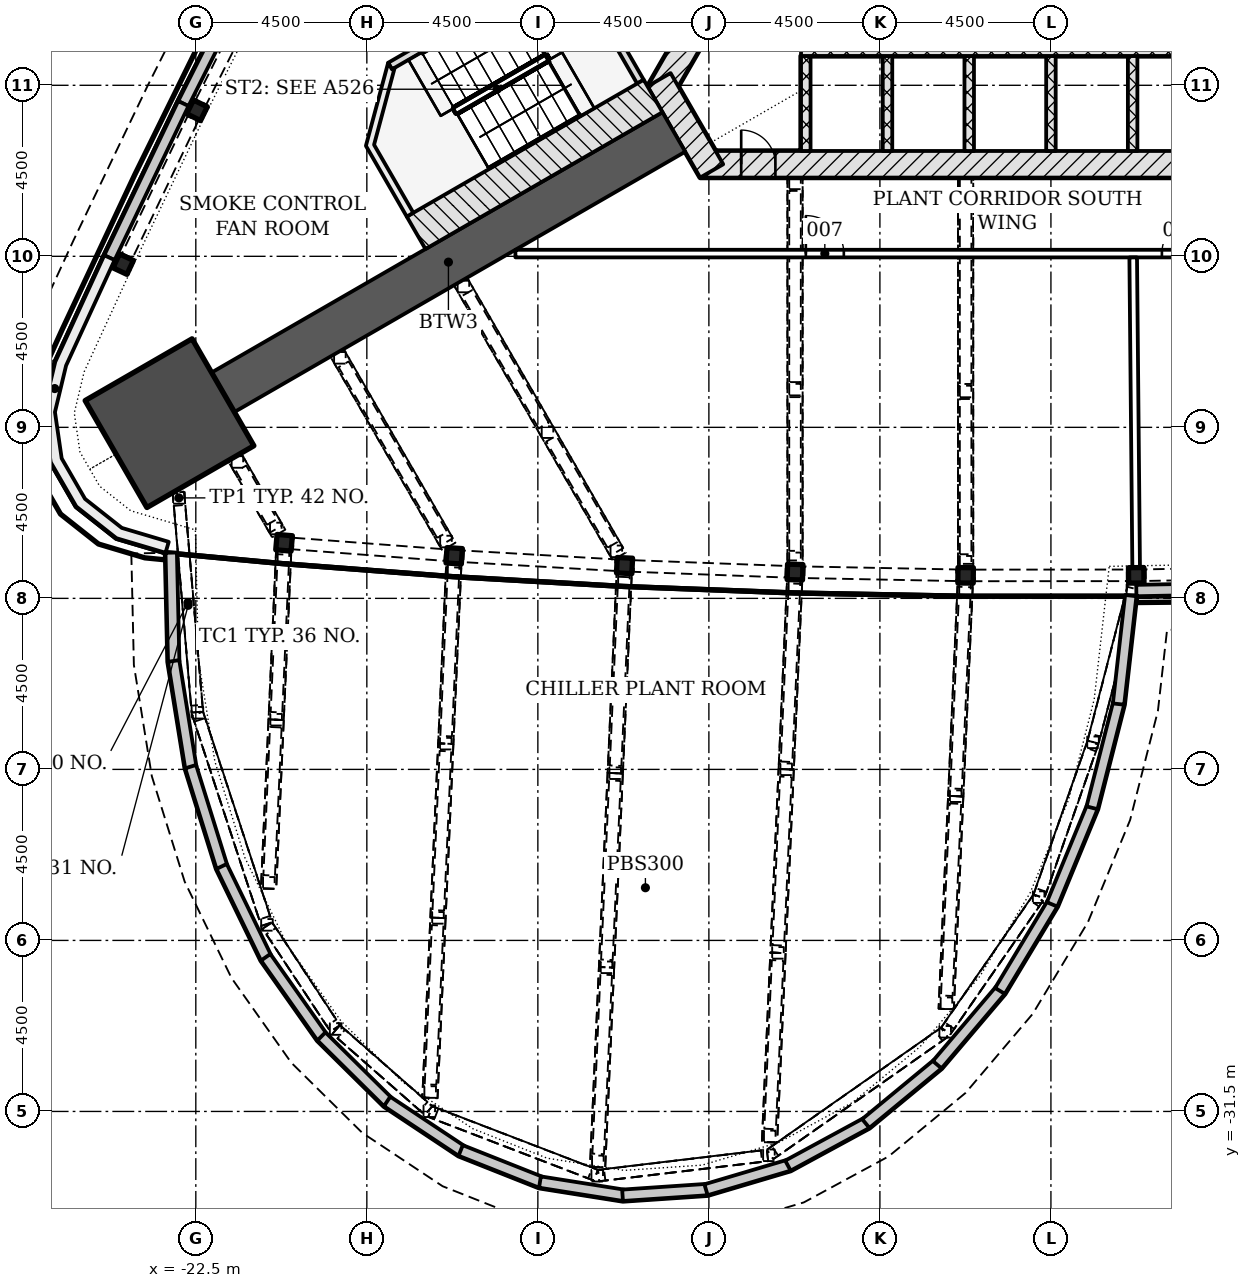
"""IFC4 building model, lengths in metres.
Left out: names, types, materials, properties, quantities, classifications, styles, units other than length and angle.
Written with IfcOpenShell. Run it as: python <this file> out.ifc"""

import sys

from ifc_helpers import new_model, si_unit, direction, frame, frame_2d, origin, origin_2d, place, context, subcontext, project, spatial, polyline, rectangle, i_section, outline, extrude, element, fill, save


model = new_model("IFC4")
c1 = context("Model", 3, precision=1e-05, world=origin(), true_north=direction((0.0, 1.0)))
c2 = subcontext(c1, "Body", "Model", "MODEL_VIEW")
j1 = project(units=[si_unit("LENGTHUNIT", "METRE"), si_unit("PLANEANGLEUNIT", "RADIAN")], contexts=[c1])
p1 = place(None, origin())
s1 = spatial("IfcSite", under=j1, at=p1, CompositionType="ELEMENT")
p2 = place(p1, origin())
s2 = spatial("IfcBuilding", under=s1, at=p2, CompositionType="ELEMENT")
p3 = place(p2, frame((0.0, 0.0, 52.8)))
s3 = spatial("IfcBuildingStorey", under=s2, at=p3, CompositionType="ELEMENT", Elevation=52.8)
p4 = place(p3, frame((-9.229, -6.578, -0.3), z_axis=(0.0, 0.0, 1.0), x_axis=(1.0, 0.0, 0.0)))
e1 = element("IfcWall", 1, at=p4, inside=s3, PredefinedType="SHEAR", context=c2, shape_type="SweptSolid", body=[
    extrude(rectangle(XDim=18.458, YDim=0.7, at=frame_2d((9.229, 0.0))), origin(), (0.0, 0.0, 1.0), 5.5),
])
p5 = place(p4, frame((1.079, 0.0, 0.3)))
e2 = element("IfcOpeningElement", 2, at=p5, cuts=e1, PredefinedType="OPENING", context=c2, shape_type="SweptSolid", body=[
    extrude(rectangle(XDim=0.9, YDim=2.1, at=frame_2d((0.45, 1.05))), frame((0.0, 0.36, 0.0), z_axis=(0.0, -1.0, 0.0), x_axis=(1.0, 0.0, 0.0)), (0.0, 0.0, 1.0), 0.72),
])
p6 = place(p3, frame((10.311, -4.703, -0.3), z_axis=(0.0, 0.0, 1.0), x_axis=(-0.500001446645, 0.866024568562, 0.0)))
e3 = element("IfcWall", 3, at=p6, inside=s3, PredefinedType="SHEAR", context=c2, shape_type="SweptSolid", body=[
    extrude(rectangle(XDim=18.458, YDim=0.7, at=frame_2d((9.229, 0.0))), origin(), (0.0, 0.0, 1.0), 5.5),
])
p7 = place(p6, frame((8.7, 0.0, 0.3)))
e4 = element("IfcOpeningElement", 4, at=p7, cuts=e3, PredefinedType="OPENING", context=c2, shape_type="SweptSolid", body=[
    extrude(rectangle(XDim=1.0, YDim=2.1, at=frame_2d((0.5, 1.05))), frame((0.0, 0.36, 0.0), z_axis=(0.0, -1.0, 0.0), x_axis=(1.0, 0.0, 0.0)), (0.0, 0.0, 1.0), 0.72),
])
p8 = place(p6, frame((4.002, 0.0, 0.3)))
e5 = element("IfcOpeningElement", 5, at=p8, cuts=e3, PredefinedType="OPENING", context=c2, shape_type="SweptSolid", body=[
    extrude(rectangle(XDim=0.9, YDim=2.1, at=frame_2d((0.45, 1.05))), frame((0.0, 0.36, 0.0), z_axis=(0.0, -1.0, 0.0), x_axis=(1.0, 0.0, 0.0)), (0.0, 0.0, 1.0), 0.72),
])
p9 = place(p6, frame((14.093, 0.0, 0.3)))
e6 = element("IfcOpeningElement", 6, at=p9, cuts=e3, PredefinedType="OPENING", context=c2, shape_type="SweptSolid", body=[
    extrude(rectangle(XDim=0.9, YDim=2.1, at=frame_2d((0.45, 1.05))), frame((0.0, 0.36, 0.0), z_axis=(0.0, -1.0, 0.0), x_axis=(1.0, 0.0, 0.0)), (0.0, 0.0, 1.0), 0.72),
])
p10 = place(p3, frame((-1.083, 11.281, -0.3), z_axis=(0.0, 0.0, 1.0), x_axis=(-0.500001446645, -0.866024568562, 0.0)))
e7 = element("IfcWall", 7, at=p10, inside=s3, PredefinedType="SHEAR", context=c2, shape_type="SweptSolid", body=[
    extrude(rectangle(XDim=18.458, YDim=0.7, at=frame_2d((9.229, 0.0))), origin(), (0.0, 0.0, 1.0), 5.5),
])
p11 = place(p10, frame((8.979, 0.0, 0.3)))
e8 = element("IfcOpeningElement", 8, at=p11, cuts=e7, PredefinedType="OPENING", context=c2, shape_type="SweptSolid", body=[
    extrude(rectangle(XDim=1.2, YDim=2.1, at=frame_2d((0.6, 1.05))), frame((0.0, 0.36, 0.0), z_axis=(0.0, -1.0, 0.0), x_axis=(1.0, 0.0, 0.0)), (0.0, 0.0, 1.0), 0.72),
])
p12 = place(p10, frame((11.029, 0.0, 0.3)))
e9 = element("IfcOpeningElement", 9, at=p12, cuts=e7, PredefinedType="OPENING", context=c2, shape_type="SweptSolid", body=[
    extrude(rectangle(XDim=1.2, YDim=2.1, at=frame_2d((0.6, 1.05))), frame((0.0, 0.36, 0.0), z_axis=(0.0, -1.0, 0.0), x_axis=(1.0, 0.0, 0.0)), (0.0, 0.0, 1.0), 0.72),
])
p13 = place(p3, frame((-10.311, -4.353, -0.3), z_axis=(0.0, 0.0, 1.0), x_axis=(0.500042739161, -0.866000726912, 0.0)))
e10 = element("IfcWall", 10, at=p13, inside=s3, PredefinedType="SHEAR", context=c2, shape_type="SweptSolid", body=[
    extrude(rectangle(XDim=2.771, YDim=0.7, at=frame_2d((1.386, 0.0))), origin(), (0.0, 0.0, 1.0), 5.5),
])
p14 = place(p3, frame((-9.922, -5.728, -0.3), z_axis=(0.0, 0.0, 1.0), x_axis=(-0.866030067197, -0.499991922645, 0.0)))
e11 = element("IfcWall", 11, at=p14, inside=s3, PredefinedType="SHEAR", context=c2, shape_type="SweptSolid", body=[
    extrude(rectangle(XDim=13.698, YDim=1.2, at=frame_2d((6.849, 0.0))), origin(), (0.0, 0.0, 1.0), 5.5),
])
p15 = place(p3, frame((-23.192, -13.39, -0.3), z_axis=(0.0, 0.0, 1.0), x_axis=(-0.866025403784, -0.5, 0.0)))
e12 = element("IfcColumn", 12, at=p15, inside=s3, PredefinedType="COLUMN", context=c2, shape_type="SweptSolid", body=[
    extrude(rectangle(XDim=3.25, YDim=3.25, at=origin_2d()), origin(), (0.0, 0.0, 1.0), 5.5),
])
for number, where, z_axis, x_axis in (
    (13, (-22.469, -5.158, -0.3), (0.0, 0.0, 1.0), (-0.441, -0.897, 0.0)),
    (14, (-24.411, -9.206, -0.3), (0.0, 0.0, 1.0), (-0.424, -0.906, 0.0)),
    (15, (-20.178, -16.537, -0.3), (0.0, 0.0, 1.0), (0.996, -0.086, 0.0)),
    (16, (-15.702, -16.88, -0.3), (0.0, 0.0, 1.0), (0.998, -0.067, 0.0)),
    (17, (-11.219, -17.137, -0.3), (0.0, 0.0, 1.0), (0.999, -0.048, 0.0)),
    (18, (-6.733, -17.308, -0.3), (0.0, 0.0, 1.0), (1.0, -0.029, 0.0)),
    (19, (-2.245, -17.394, -0.3), (0.0, 0.0, 1.0), (1.0, -0.01, 0.0)),
    (20, (2.245, -17.394, -0.3), (0.0, 0.0, 1.0), (1.0, 0.01, 0.0)),
):
    element("IfcColumn", number, at=place(p3, frame(where, z_axis=z_axis, x_axis=x_axis)), inside=s3, PredefinedType="COLUMN", context=c2, shape_type="SweptSolid", body=[
        extrude(i_section(OverallWidth=0.404, OverallDepth=0.406, WebThickness=0.027, FlangeThickness=0.044, FilletRadius=0.015, at=origin_2d()), origin(), (0.0, 0.0, 1.0), 5.5),
    ])
p16 = place(p3, origin())
e21 = element("IfcWall", 21, at=p16, inside=s3, PredefinedType="NOTDEFINED", context=c2, shape_type="SweptSolid", body=[
    extrude(outline(polyline([(-20.94, -0.896), (-22.963, -4.916), (-22.695, -5.05), (-20.672, -1.031), (-20.94, -0.896)])), origin(), (0.0, 0.0, 1.0), 1.2),
])
p17 = place(p3, origin())
e22 = element("IfcWall", 22, at=p17, inside=s3, PredefinedType="NOTDEFINED", context=c2, shape_type="SweptSolid", body=[
    extrude(outline(polyline([(-22.963, -4.916), (-24.909, -8.973), (-24.638, -9.103), (-22.692, -5.045), (-22.963, -4.916)])), origin(), (0.0, 0.0, 1.0), 1.2),
])
p18 = place(p3, origin())
e23 = element("IfcWall", 23, at=p18, inside=s3, PredefinedType="NOTDEFINED", context=c2, shape_type="SweptSolid", body=[
    extrude(outline(polyline([(-23.297, -16.8), (-23.231, -19.671), (-22.931, -19.665), (-22.997, -16.793), (-23.297, -16.8)])), origin(), (0.0, 0.0, 1.0), 1.2),
])
p19 = place(p3, origin())
e24 = element("IfcWall", 24, at=p19, inside=s3, PredefinedType="NOTDEFINED", context=c2, shape_type="SweptSolid", body=[
    extrude(outline(polyline([(-23.231, -19.671), (-22.779, -22.472), (-22.483, -22.425), (-22.935, -19.624), (-23.231, -19.671)])), origin(), (0.0, 0.0, 1.0), 1.2),
])
p20 = place(p3, origin())
e25 = element("IfcWall", 25, at=p20, inside=s3, PredefinedType="NOTDEFINED", context=c2, shape_type="SweptSolid", body=[
    extrude(outline(polyline([(-22.779, -22.472), (-21.955, -25.119), (-21.668, -25.03), (-22.493, -22.383), (-22.779, -22.472)])), origin(), (0.0, 0.0, 1.0), 1.2),
])
p21 = place(p3, origin())
e26 = element("IfcWall", 26, at=p21, inside=s3, PredefinedType="NOTDEFINED", context=c2, shape_type="SweptSolid", body=[
    extrude(outline(polyline([(-21.955, -25.119), (-20.783, -27.53), (-20.513, -27.398), (-21.685, -24.988), (-21.955, -25.119)])), origin(), (0.0, 0.0, 1.0), 1.2),
])
p22 = place(p3, origin())
e27 = element("IfcWall", 27, at=p22, inside=s3, PredefinedType="NOTDEFINED", context=c2, shape_type="SweptSolid", body=[
    extrude(outline(polyline([(-20.783, -27.53), (-19.3, -29.632), (-19.054, -29.459), (-20.538, -27.356), (-20.783, -27.53)])), origin(), (0.0, 0.0, 1.0), 1.2),
])
p23 = place(p3, origin())
e28 = element("IfcWall", 28, at=p23, inside=s3, PredefinedType="NOTDEFINED", context=c2, shape_type="SweptSolid", body=[
    extrude(outline(polyline([(-19.3, -29.632), (-17.55, -31.361), (-17.339, -31.148), (-19.089, -29.418), (-19.3, -29.632)])), origin(), (0.0, 0.0, 1.0), 1.2),
])
p24 = place(p3, origin())
e29 = element("IfcWall", 29, at=p24, inside=s3, PredefinedType="NOTDEFINED", context=c2, shape_type="SweptSolid", body=[
    extrude(outline(polyline([(-17.55, -31.361), (-15.586, -32.666), (-15.42, -32.416), (-17.384, -31.112), (-17.55, -31.361)])), origin(), (0.0, 0.0, 1.0), 1.2),
])
p25 = place(p3, origin())
e30 = element("IfcWall", 30, at=p25, inside=s3, PredefinedType="NOTDEFINED", context=c2, shape_type="SweptSolid", body=[
    extrude(outline(polyline([(-15.586, -32.666), (-13.469, -33.506), (-13.358, -33.227), (-15.475, -32.387), (-15.586, -32.666)])), origin(), (0.0, 0.0, 1.0), 1.2),
])
p26 = place(p3, origin())
e31 = element("IfcWall", 31, at=p26, inside=s3, PredefinedType="NOTDEFINED", context=c2, shape_type="SweptSolid", body=[
    extrude(outline(polyline([(-13.469, -33.506), (-11.262, -33.856), (-11.215, -33.559), (-13.422, -33.21), (-13.469, -33.506)])), origin(), (0.0, 0.0, 1.0), 1.2),
])
p27 = place(p3, origin())
e32 = element("IfcWall", 32, at=p27, inside=s3, PredefinedType="NOTDEFINED", context=c2, shape_type="SweptSolid", body=[
    extrude(outline(polyline([(-11.262, -33.856), (-9.032, -33.705), (-9.052, -33.405), (-11.282, -33.556), (-11.262, -33.856)])), origin(), (0.0, 0.0, 1.0), 1.2),
])
p28 = place(p3, origin())
e33 = element("IfcWall", 33, at=p28, inside=s3, PredefinedType="NOTDEFINED", context=c2, shape_type="SweptSolid", body=[
    extrude(outline(polyline([(-9.032, -33.705), (-6.848, -33.057), (-6.934, -32.77), (-9.117, -33.417), (-9.032, -33.705)])), origin(), (0.0, 0.0, 1.0), 1.2),
])
p29 = place(p3, origin())
e34 = element("IfcWall", 34, at=p29, inside=s3, PredefinedType="NOTDEFINED", context=c2, shape_type="SweptSolid", body=[
    extrude(outline(polyline([(-6.848, -33.057), (-4.776, -31.933), (-4.919, -31.67), (-6.991, -32.793), (-6.848, -33.057)])), origin(), (0.0, 0.0, 1.0), 1.2),
])
p30 = place(p3, origin())
e35 = element("IfcWall", 35, at=p30, inside=s3, PredefinedType="NOTDEFINED", context=c2, shape_type="SweptSolid", body=[
    extrude(outline(polyline([(-4.776, -31.933), (-2.878, -30.367), (-3.069, -30.135), (-4.967, -31.702), (-4.776, -31.933)])), origin(), (0.0, 0.0, 1.0), 1.2),
])
p31 = place(p3, origin())
e36 = element("IfcWall", 36, at=p31, inside=s3, PredefinedType="NOTDEFINED", context=c2, shape_type="SweptSolid", body=[
    extrude(outline(polyline([(-2.878, -30.367), (-1.213, -28.406), (-1.441, -28.211), (-3.107, -30.173), (-2.878, -30.367)])), origin(), (0.0, 0.0, 1.0), 1.2),
])
p32 = place(p3, origin())
e37 = element("IfcWall", 37, at=p32, inside=s3, PredefinedType="NOTDEFINED", context=c2, shape_type="SweptSolid", body=[
    extrude(outline(polyline([(-1.213, -28.406), (0.17, -26.109), (-0.087, -25.955), (-1.47, -28.251), (-1.213, -28.406)])), origin(), (0.0, 0.0, 1.0), 1.2),
])
p33 = place(p3, origin())
e38 = element("IfcWall", 38, at=p33, inside=s3, PredefinedType="NOTDEFINED", context=c2, shape_type="SweptSolid", body=[
    extrude(outline(polyline([(0.17, -26.109), (1.227, -23.547), (0.95, -23.433), (-0.108, -25.995), (0.17, -26.109)])), origin(), (0.0, 0.0, 1.0), 1.2),
])
p34 = place(p3, origin())
e39 = element("IfcWall", 39, at=p34, inside=s3, PredefinedType="NOTDEFINED", context=c2, shape_type="SweptSolid", body=[
    extrude(outline(polyline([(1.227, -23.547), (1.928, -20.798), (1.637, -20.724), (0.937, -23.473), (1.227, -23.547)])), origin(), (0.0, 0.0, 1.0), 1.2),
])
p35 = place(p3, origin())
e40 = element("IfcWall", 40, at=p35, inside=s3, PredefinedType="NOTDEFINED", context=c2, shape_type="SweptSolid", body=[
    extrude(outline(polyline([(1.928, -20.798), (2.25, -17.944), (1.952, -17.91), (1.63, -20.764), (1.928, -20.798)])), origin(), (0.0, 0.0, 1.0), 1.2),
])
p36 = place(p3, origin())
e41 = element("IfcWall", 41, at=p36, inside=s3, PredefinedType="NOTDEFINED", context=c2, shape_type="SweptSolid", body=[
    extrude(outline(polyline([(2.25, -17.944), (6.749, -17.858), (6.743, -17.558), (2.244, -17.644), (2.25, -17.944)])), origin(), (0.0, 0.0, 1.0), 1.2),
])
p37 = place(p3, origin())
e42 = element("IfcWall", 42, at=p37, inside=s3, PredefinedType="NOTDEFINED", context=c2, shape_type="SweptSolid", body=[
    extrude(outline(polyline([(-24.909, -8.973), (-26.198, -11.776), (-26.511, -13.085), (-26.318, -14.417), (-25.645, -15.583), (-24.588, -16.417), (-23.297, -16.8), (-23.212, -16.513), (-24.447, -16.146), (-25.414, -15.384), (-26.029, -14.317), (-26.206, -13.099), (-25.913, -11.875), (-24.636, -9.098), (-24.909, -8.973)])), origin(), (0.0, 0.0, 1.0), 5.2),
])
for number, where, z_axis, x_axis in (
    (43, (-6.45, -6.228, -0.3), (0.0, 0.0, 1.0), (0.0, 1.0, 0.0)),
    (44, (-4.3, -6.228, -0.3), (0.0, 0.0, 1.0), (0.0, 1.0, 0.0)),
    (45, (-2.15, -6.228, -0.3), (0.0, 0.0, 1.0), (0.0, 1.0, 0.0)),
    (46, (0.0, -6.228, -0.3), (0.0, 0.0, 1.0), (0.0, 1.0, 0.0)),
    (47, (2.15, -6.228, -0.3), (0.0, 0.0, 1.0), (0.0, 1.0, 0.0)),
):
    element("IfcWall", number, at=place(p3, frame(where, z_axis=z_axis, x_axis=x_axis)), inside=s3, PredefinedType="PARTITIONING", context=c2, shape_type="SweptSolid", body=[
        extrude(rectangle(XDim=2.5, YDim=0.25, at=frame_2d((1.25, 0.0))), origin(), (0.0, 0.0, 1.0), 5.5),
    ])
p38 = place(p3, frame((-6.575, -3.603, 0.0), z_axis=(0.0, 0.0, 1.0), x_axis=(1.0, 0.0, 0.0)))
e48 = element("IfcWall", 48, at=p38, inside=s3, PredefinedType="PARTITIONING", context=c2, shape_type="SweptSolid", body=[
    extrude(rectangle(XDim=13.15, YDim=0.25, at=frame_2d((6.575, 0.0))), origin(), (0.0, 0.0, 1.0), 5.2),
])
p39 = place(p3, frame((-12.576, -1.331, -0.3), z_axis=(0.0, 0.0, 1.0), x_axis=(0.499970499736, -0.8660424351, 0.0)))
e49 = element("IfcWall", 49, at=p39, inside=s3, PredefinedType="SHEAR", context=c2, shape_type="SweptSolid", body=[
    extrude(rectangle(XDim=3.55, YDim=0.2, at=frame_2d((1.775, 0.0))), origin(), (0.0, 0.0, 1.0), 5.5),
])
p40 = place(p39, frame((1.175, 0.0, 0.3)))
e50 = element("IfcOpeningElement", 50, at=p40, cuts=e49, PredefinedType="OPENING", context=c2, shape_type="SweptSolid", body=[
    extrude(rectangle(XDim=1.2, YDim=2.1, at=frame_2d((0.6, 1.05))), frame((0.0, 0.11, 0.0), z_axis=(0.0, -1.0, 0.0), x_axis=(1.0, 0.0, 0.0)), (0.0, 0.0, 1.0), 0.22),
])
p41 = place(p3, frame((-12.539, -1.194, -0.3), z_axis=(0.0, 0.0, 1.0), x_axis=(-0.866045472092, -0.499965239061, 0.0)))
e51 = element("IfcWall", 51, at=p41, inside=s3, PredefinedType="SHEAR", context=c2, shape_type="SweptSolid", body=[
    extrude(rectangle(XDim=5.6, YDim=0.2, at=frame_2d((2.8, 0.0))), origin(), (0.0, 0.0, 1.0), 5.5),
])
p42 = place(p41, frame((0.45, 0.0, 0.3)))
e52 = element("IfcOpeningElement", 52, at=p42, cuts=e51, PredefinedType="OPENING", context=c2, shape_type="SweptSolid", body=[
    extrude(rectangle(XDim=1.2, YDim=2.1, at=frame_2d((0.6, 1.05))), frame((0.0, 0.11, 0.0), z_axis=(0.0, -1.0, 0.0), x_axis=(1.0, 0.0, 0.0)), (0.0, 0.0, 1.0), 0.22),
])
p43 = place(p3, frame((-10.468, -4.782, -0.3), z_axis=(0.0, 0.0, 1.0), x_axis=(-0.866018442252, -0.500012057535, 0.0)))
e53 = element("IfcWall", 53, at=p43, inside=s3, PredefinedType="SHEAR", context=c2, shape_type="SweptSolid", body=[
    extrude(rectangle(XDim=7.2, YDim=0.986, at=frame_2d((3.6, 0.0))), origin(), (0.0, 0.0, 1.0), 5.5),
])
p44 = place(p3, frame((0.0, 0.0, -0.3)))
e54 = element("IfcWall", 54, at=p44, inside=s3, PredefinedType="SHEAR", context=c2, shape_type="SweptSolid", body=[
    extrude(outline(polyline([(-17.439, -3.907), (-18.025, -6.093), (-16.95, -7.955), (-16.777, -7.855), (-17.81, -6.065), (-17.267, -4.039), (-17.339, -4.081), (-17.339, -4.081), (-17.339, -4.081), (-17.339, -4.081), (-17.339, -4.081), (-17.339, -4.081), (-17.339, -4.081), (-17.339, -4.081), (-17.339, -4.081), (-17.339, -4.081), (-17.339, -4.081), (-17.339, -4.081), (-17.339, -4.081), (-17.339, -4.081), (-17.339, -4.081), (-17.339, -4.081), (-17.339, -4.081), (-17.439, -3.907)])), origin(), (0.0, 0.0, 1.0), 5.5),
])
p45 = place(p3, frame((-14.091, -8.928, 0.0), z_axis=(0.0, 0.0, 1.0), x_axis=(1.0, 0.0, 0.0)))
e55 = element("IfcWall", 55, at=p45, inside=s3, PredefinedType="PARTITIONING", context=c2, shape_type="SweptSolid", body=[
    extrude(rectangle(XDim=18.991, YDim=0.2, at=frame_2d((9.495, 0.0))), origin(), (0.0, 0.0, 1.0), 4.578),
])
p46 = place(p45, frame((7.642, 0.0, 0.0)))
e56 = element("IfcOpeningElement", 56, at=p46, cuts=e55, PredefinedType="OPENING", context=c2, shape_type="SweptSolid", body=[
    extrude(rectangle(XDim=1.0, YDim=2.1, at=frame_2d((0.5, 1.05))), frame((0.0, 0.11, 0.0), z_axis=(0.0, -1.0, 0.0), x_axis=(1.0, 0.0, 0.0)), (0.0, 0.0, 1.0), 0.22),
])
p47 = place(p45, frame((17.011, 0.0, 0.0)))
e57 = element("IfcOpeningElement", 57, at=p47, cuts=e55, PredefinedType="OPENING", context=c2, shape_type="SweptSolid", body=[
    extrude(rectangle(XDim=1.0, YDim=2.1, at=frame_2d((0.5, 1.05))), frame((0.0, 0.11, 0.0), z_axis=(0.0, -1.0, 0.0), x_axis=(1.0, 0.0, 0.0)), (0.0, 0.0, 1.0), 0.22),
])
p48 = place(p3, frame((2.165, -9.029, 0.0), z_axis=(0.0, 0.0, 1.0), x_axis=(0.009569508604, -0.999954211204, 0.0)))
e58 = element("IfcWall", 58, at=p48, inside=s3, PredefinedType="PARTITIONING", context=c2, shape_type="SweptSolid", body=[
    extrude(rectangle(XDim=8.215, YDim=0.2, at=frame_2d((4.107, 0.0))), origin(), (0.0, 0.0, 1.0), 4.578),
])
p49 = place(p5, origin())
e59 = element("IfcDoor", 59, at=p49, inside=s3, OperationType="SINGLE_SWING_LEFT", PredefinedType="DOOR", context=c2, shape_type="SweptSolid", body=[
    extrude(rectangle(XDim=0.9, YDim=2.1, at=frame_2d((0.45, 1.05))), frame((0.0, 0.075, 0.0), z_axis=(0.0, -1.0, 0.0), x_axis=(1.0, 0.0, 0.0)), (0.0, 0.0, 1.0), 0.15),
])
fill(e2, e59)
p50 = place(p46, origin())
e60 = element("IfcDoor", 60, at=p50, inside=s3, OperationType="SINGLE_SWING_LEFT", PredefinedType="DOOR", context=c2, shape_type="SweptSolid", body=[
    extrude(rectangle(XDim=1.0, YDim=2.1, at=frame_2d((0.5, 1.05))), frame((0.0, 0.025, 0.0), z_axis=(0.0, -1.0, 0.0), x_axis=(1.0, 0.0, 0.0)), (0.0, 0.0, 1.0), 0.05),
])
fill(e56, e60)
p51 = place(p47, origin())
e61 = element("IfcDoor", 61, at=p51, inside=s3, OperationType="SINGLE_SWING_RIGHT", PredefinedType="DOOR", context=c2, shape_type="SweptSolid", body=[
    extrude(rectangle(XDim=1.0, YDim=2.1, at=frame_2d((0.5, 1.05))), frame((0.0, 0.025, 0.0), z_axis=(0.0, -1.0, 0.0), x_axis=(1.0, 0.0, 0.0)), (0.0, 0.0, 1.0), 0.05),
])
fill(e57, e61)
save(model, sys.argv[1])
